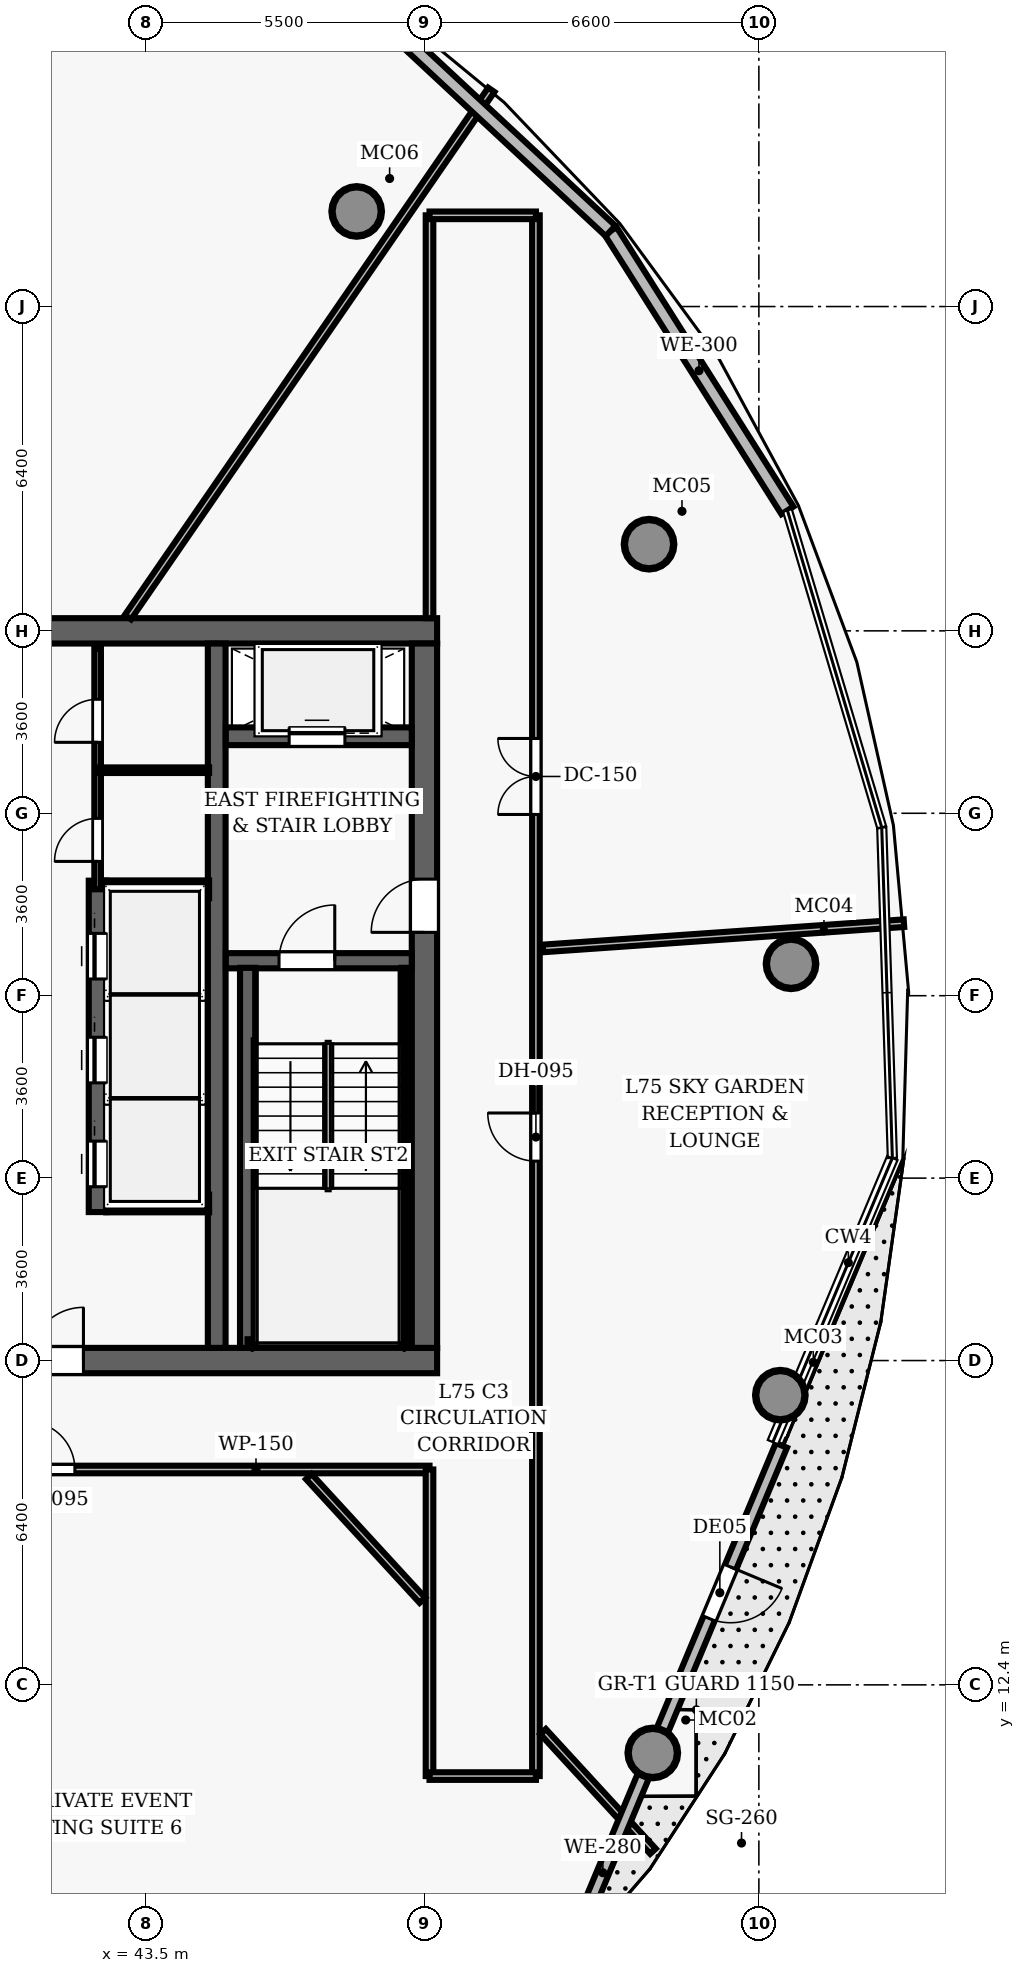
"""IFC4 building model, lengths in metres.
Left out: names, types, materials, properties, quantities, classifications, styles, units other than length and angle.
Written with IfcOpenShell. Run it as: python <this file> out.ifc"""

import sys

from ifc_helpers import new_model, si_unit, direction, frame, frame_2d, origin, origin_2d, place, context, subcontext, project, spatial, rectangle, hollow_circle, extrude, element, fill, save


model = new_model("IFC4")
c1 = context("Model", 3, precision=1e-05, world=origin(), true_north=direction((0.0, 1.0)))
c2 = subcontext(c1, "Body", "Model", "MODEL_VIEW")
j1 = project(units=[si_unit("LENGTHUNIT", "METRE"), si_unit("PLANEANGLEUNIT", "RADIAN")], contexts=[c1])
p1 = place(None, origin())
s1 = spatial("IfcSite", under=j1, at=p1, CompositionType="ELEMENT")
p2 = place(p1, origin())
s2 = spatial("IfcBuilding", under=s1, at=p2, CompositionType="ELEMENT")
p3 = place(p2, frame((0.0, 0.0, 295.95)))
s3 = spatial("IfcBuildingStorey", under=s2, at=p3, CompositionType="ELEMENT", Elevation=295.95)
p4 = place(p3, frame((26.75, 18.8, 0.0), z_axis=(0.0, 0.0, 1.0), x_axis=(1.0, 0.0, 0.0)))
e1 = element("IfcWall", 1, at=p4, inside=s3, PredefinedType="SHEAR", context=c2, shape_type="SweptSolid", body=[
    extrude(rectangle(XDim=22.5, YDim=0.5, at=frame_2d((11.25, 0.0))), origin(), (0.0, 0.0, 1.0), 3.85),
])
p5 = place(p4, frame((14.47, 0.0, 0.0)))
e2 = element("IfcOpeningElement", 2, at=p5, cuts=e1, PredefinedType="OPENING", context=c2, shape_type="SweptSolid", body=[
    extrude(rectangle(XDim=1.05, YDim=2.15, at=frame_2d((0.525, 1.075))), frame((0.0, 0.26, 0.0), z_axis=(0.0, -1.0, 0.0), x_axis=(1.0, 0.0, 0.0)), (0.0, 0.0, 1.0), 0.52),
])
p6 = place(p3, frame((26.75, 33.2, 0.0), z_axis=(0.0, 0.0, 1.0), x_axis=(1.0, 0.0, 0.0)))
e3 = element("IfcWall", 3, at=p6, inside=s3, PredefinedType="SHEAR", context=c2, shape_type="SweptSolid", body=[
    extrude(rectangle(XDim=22.5, YDim=0.5, at=frame_2d((11.25, 0.0))), origin(), (0.0, 0.0, 1.0), 3.85),
])
p7 = place(p3, frame((49.0, 19.05, 0.0), z_axis=(0.0, 0.0, 1.0), x_axis=(0.0, 1.0, 0.0)))
e4 = element("IfcWall", 4, at=p7, inside=s3, PredefinedType="SHEAR", context=c2, shape_type="SweptSolid", body=[
    extrude(rectangle(XDim=13.9, YDim=0.5, at=frame_2d((6.95, 0.0))), origin(), (0.0, 0.0, 1.0), 3.85),
])
p8 = place(p7, frame((8.2, 0.0, 0.0)))
e5 = element("IfcOpeningElement", 5, at=p8, cuts=e4, PredefinedType="OPENING", context=c2, shape_type="SweptSolid", body=[
    extrude(rectangle(XDim=1.05, YDim=2.15, at=frame_2d((0.525, 1.075))), frame((0.0, 0.26, 0.0), z_axis=(0.0, -1.0, 0.0), x_axis=(1.0, 0.0, 0.0)), (0.0, 0.0, 1.0), 0.52),
])
p9 = place(p3, frame((44.9, 19.05, 0.0), z_axis=(0.0, 0.0, 1.0), x_axis=(0.0, 1.0, 0.0)))
e6 = element("IfcWall", 6, at=p9, inside=s3, PredefinedType="SHEAR", context=c2, shape_type="SweptSolid", body=[
    extrude(rectangle(XDim=13.9, YDim=0.35, at=frame_2d((6.95, 0.0))), origin(), (0.0, 0.0, 1.0), 3.85),
])
for number, where, z_axis, x_axis in (
    (7, (53.506, 11.056, 0.0), (0.0, 0.0, 1.0), (1.0, 0.0, 0.0)),
    (8, (56.024, 18.116, 0.0), (0.0, 0.0, 1.0), (1.0, 0.0, 0.0)),
    (9, (56.235, 26.629, 0.0), (0.0, 0.0, 1.0), (1.0, 0.0, 0.0)),
    (10, (53.433, 34.91, 0.0), (0.0, 0.0, 1.0), (1.0, 0.0, 0.0)),
    (11, (47.662, 41.477, 0.0), (0.0, 0.0, 1.0), (1.0, 0.0, 0.0)),
):
    element("IfcColumn", number, at=place(p3, frame(where, z_axis=z_axis, x_axis=x_axis)), inside=s3, PredefinedType="COLUMN", context=c2, shape_type="SweptSolid", body=[
        extrude(hollow_circle(Radius=0.5, WallThickness=0.045, at=origin_2d()), origin(), (0.0, 0.0, 1.0), 3.85),
    ])
p10 = place(p3, frame((45.08, 26.69, 0.0), z_axis=(0.0, 0.0, 1.0), x_axis=(1.0, 0.0, 0.0)))
e12 = element("IfcWall", 12, at=p10, inside=s3, PredefinedType="SHEAR", context=c2, shape_type="SweptSolid", body=[
    extrude(rectangle(XDim=3.67, YDim=0.3, at=frame_2d((1.835, 0.0))), origin(), (0.0, 0.0, 1.0), 3.85),
])
p11 = place(p10, frame((1.05, 0.0, 0.0)))
e13 = element("IfcOpeningElement", 13, at=p11, cuts=e12, PredefinedType="OPENING", context=c2, shape_type="SweptSolid", body=[
    extrude(rectangle(XDim=1.1, YDim=2.15, at=frame_2d((0.55, 1.075))), frame((0.0, 0.16, 0.0), z_axis=(0.0, -1.0, 0.0), x_axis=(1.0, 0.0, 0.0)), (0.0, 0.0, 1.0), 0.32),
])
p12 = place(p3, frame((45.51, 19.05, 0.0), z_axis=(0.0, 0.0, 1.0), x_axis=(0.0, 1.0, 0.0)))
e14 = element("IfcWall", 14, at=p12, inside=s3, PredefinedType="SHEAR", context=c2, shape_type="SweptSolid", body=[
    extrude(rectangle(XDim=7.5, YDim=0.3, at=frame_2d((3.75, 0.0))), origin(), (0.0, 0.0, 1.0), 3.85),
])
p13 = place(p3, frame((48.605, 19.1, 0.0), z_axis=(0.0, 0.0, 1.0), x_axis=(0.0, 1.0, 0.0)))
e15 = element("IfcWall", 15, at=p13, inside=s3, PredefinedType="SHEAR", context=c2, shape_type="SweptSolid", body=[
    extrude(rectangle(XDim=7.45, YDim=0.12, at=frame_2d((3.725, 0.0))), origin(), (0.0, 0.0, 1.0), 3.85),
])
p14 = place(p3, frame((45.51, 19.16, 0.0), z_axis=(0.0, 0.0, 1.0), x_axis=(1.0, 0.0, 0.0)))
e16 = element("IfcWall", 16, at=p14, inside=s3, PredefinedType="SHEAR", context=c2, shape_type="SweptSolid", body=[
    extrude(rectangle(XDim=3.095, YDim=0.12, at=frame_2d((1.547, 0.0))), origin(), (0.0, 0.0, 1.0), 3.85),
])
p15 = place(p3, frame((45.08, 31.12, 0.0), z_axis=(0.0, 0.0, 1.0), x_axis=(1.0, 0.0, 0.0)))
e17 = element("IfcWall", 17, at=p15, inside=s3, PredefinedType="SHEAR", context=c2, shape_type="SweptSolid", body=[
    extrude(rectangle(XDim=3.67, YDim=0.35, at=frame_2d((1.835, 0.0))), origin(), (0.0, 0.0, 1.0), 3.04),
])
p16 = place(p15, frame((1.25, 0.0, 0.0)))
e18 = element("IfcOpeningElement", 18, at=p16, cuts=e17, PredefinedType="OPENING", context=c2, shape_type="SweptSolid", body=[
    extrude(rectangle(XDim=1.1, YDim=2.15, at=frame_2d((0.55, 1.075))), frame((0.0, 0.185, 0.0), z_axis=(0.0, -1.0, 0.0), x_axis=(1.0, 0.0, 0.0)), (0.0, 0.0, 1.0), 0.37),
])
p17 = place(p3, frame((42.55, 21.73, 0.0), z_axis=(0.0, 0.0, 1.0), x_axis=(0.0, 1.0, 0.0)))
e19 = element("IfcWall", 19, at=p17, inside=s3, PredefinedType="SHEAR", context=c2, shape_type="SweptSolid", body=[
    extrude(rectangle(XDim=6.54, YDim=0.35, at=frame_2d((3.27, 0.0))), origin(), (0.0, 0.0, 1.0), 3.04),
])
p18 = place(p17, frame((0.5, 0.0, 0.0)))
e20 = element("IfcOpeningElement", 20, at=p18, cuts=e19, PredefinedType="OPENING", context=c2, shape_type="SweptSolid", body=[
    extrude(rectangle(XDim=0.9, YDim=2.15, at=frame_2d((0.45, 1.075))), frame((0.0, 0.185, 0.0), z_axis=(0.0, -1.0, 0.0), x_axis=(1.0, 0.0, 0.0)), (0.0, 0.0, 1.0), 0.37),
])
p19 = place(p17, frame((2.55, 0.0, 0.0)))
e21 = element("IfcOpeningElement", 21, at=p19, cuts=e19, PredefinedType="OPENING", context=c2, shape_type="SweptSolid", body=[
    extrude(rectangle(XDim=0.9, YDim=2.15, at=frame_2d((0.45, 1.075))), frame((0.0, 0.185, 0.0), z_axis=(0.0, -1.0, 0.0), x_axis=(1.0, 0.0, 0.0)), (0.0, 0.0, 1.0), 0.37),
])
p20 = place(p17, frame((4.6, 0.0, 0.0)))
e22 = element("IfcOpeningElement", 22, at=p20, cuts=e19, PredefinedType="OPENING", context=c2, shape_type="SweptSolid", body=[
    extrude(rectangle(XDim=0.9, YDim=2.15, at=frame_2d((0.45, 1.075))), frame((0.0, 0.185, 0.0), z_axis=(0.0, -1.0, 0.0), x_axis=(1.0, 0.0, 0.0)), (0.0, 0.0, 1.0), 0.37),
])
for number, where, z_axis, x_axis in (
    (23, (42.72, 21.9, 0.0), (0.0, 0.0, 1.0), (1.0, 0.0, 0.0)),
    (24, (42.72, 28.1, 0.0), (0.0, 0.0, 1.0), (1.0, 0.0, 0.0)),
):
    element("IfcWall", number, at=place(p3, frame(where, z_axis=z_axis, x_axis=x_axis)), inside=s3, PredefinedType="SHEAR", context=c2, shape_type="SweptSolid", body=[
        extrude(rectangle(XDim=2.03, YDim=0.35, at=frame_2d((1.015, 0.0))), origin(), (0.0, 0.0, 1.0), 3.04),
    ])
p21 = place(p3, frame((42.55, 28.1, 0.0), z_axis=(0.0, 0.0, 1.0), x_axis=(0.0, 1.0, 0.0)))
e25 = element("IfcWall", 25, at=p21, inside=s3, PredefinedType="PARTITIONING", context=c2, shape_type="SweptSolid", body=[
    extrude(rectangle(XDim=4.75, YDim=0.13, at=frame_2d((2.375, 0.0))), origin(), (0.0, 0.0, 1.0), 3.04),
])
p22 = place(p21, frame((0.55, 0.0, 0.0)))
e26 = element("IfcOpeningElement", 26, at=p22, cuts=e25, PredefinedType="OPENING", context=c2, shape_type="SweptSolid", body=[
    extrude(rectangle(XDim=0.85, YDim=2.1, at=frame_2d((0.425, 1.05))), frame((0.0, 0.075, 0.0), z_axis=(0.0, -1.0, 0.0), x_axis=(1.0, 0.0, 0.0)), (0.0, 0.0, 1.0), 0.15),
])
p23 = place(p21, frame((2.9, 0.0, 0.0)))
e27 = element("IfcOpeningElement", 27, at=p23, cuts=e25, PredefinedType="OPENING", context=c2, shape_type="SweptSolid", body=[
    extrude(rectangle(XDim=0.85, YDim=2.1, at=frame_2d((0.425, 1.05))), frame((0.0, 0.075, 0.0), z_axis=(0.0, -1.0, 0.0), x_axis=(1.0, 0.0, 0.0)), (0.0, 0.0, 1.0), 0.15),
])
p24 = place(p3, frame((42.55, 30.45, 0.0), z_axis=(0.0, 0.0, 1.0), x_axis=(1.0, 0.0, 0.0)))
e28 = element("IfcWall", 28, at=p24, inside=s3, PredefinedType="PARTITIONING", context=c2, shape_type="SweptSolid", body=[
    extrude(rectangle(XDim=2.2, YDim=0.11, at=frame_2d((1.1, 0.0))), origin(), (0.0, 0.0, 1.0), 3.04),
])
p25 = place(p3, frame((26.9, 16.65, 0.0), z_axis=(0.0, 0.0, 1.0), x_axis=(1.0, 0.0, 0.0)))
e29 = element("IfcWall", 29, at=p25, inside=s3, PredefinedType="PARTITIONING", context=c2, shape_type="SweptSolid", body=[
    extrude(rectangle(XDim=22.2, YDim=0.15, at=frame_2d((11.1, 0.0))), origin(), (0.0, 0.0, 1.0), 3.04),
])
p26 = place(p25, frame((6.965, 0.0, 0.0)))
e30 = element("IfcOpeningElement", 30, at=p26, cuts=e29, PredefinedType="OPENING", context=c2, shape_type="SweptSolid", body=[
    extrude(rectangle(XDim=0.95, YDim=2.15, at=frame_2d((0.475, 1.075))), frame((0.0, 0.085, 0.0), z_axis=(0.0, -1.0, 0.0), x_axis=(1.0, 0.0, 0.0)), (0.0, 0.0, 1.0), 0.17),
])
p27 = place(p25, frame((14.251, 0.0, 0.0)))
e31 = element("IfcOpeningElement", 31, at=p27, cuts=e29, PredefinedType="OPENING", context=c2, shape_type="SweptSolid", body=[
    extrude(rectangle(XDim=0.95, YDim=2.15, at=frame_2d((0.475, 1.075))), frame((0.0, 0.085, 0.0), z_axis=(0.0, -1.0, 0.0), x_axis=(1.0, 0.0, 0.0)), (0.0, 0.0, 1.0), 0.17),
])
p28 = place(p3, frame((51.2, 10.6, 0.0), z_axis=(0.0, 0.0, 1.0), x_axis=(0.0, 1.0, 0.0)))
e32 = element("IfcWall", 32, at=p28, inside=s3, PredefinedType="PARTITIONING", context=c2, shape_type="SweptSolid", body=[
    extrude(rectangle(XDim=30.8, YDim=0.15, at=frame_2d((15.4, 0.0))), origin(), (0.0, 0.0, 1.0), 3.04),
])
p29 = place(p28, frame((18.976, 0.0, 0.0)))
e33 = element("IfcOpeningElement", 33, at=p29, cuts=e32, PredefinedType="OPENING", context=c2, shape_type="SweptSolid", body=[
    extrude(rectangle(XDim=1.5, YDim=2.2, at=frame_2d((0.75, 1.1))), frame((0.0, 0.085, 0.0), z_axis=(0.0, -1.0, 0.0), x_axis=(1.0, 0.0, 0.0)), (0.0, 0.0, 1.0), 0.17),
])
p30 = place(p28, frame((12.135, 0.0, 0.0)))
e34 = element("IfcOpeningElement", 34, at=p30, cuts=e32, PredefinedType="OPENING", context=c2, shape_type="SweptSolid", body=[
    extrude(rectangle(XDim=0.95, YDim=2.15, at=frame_2d((0.475, 1.075))), frame((0.0, 0.085, 0.0), z_axis=(0.0, -1.0, 0.0), x_axis=(1.0, 0.0, 0.0)), (0.0, 0.0, 1.0), 0.17),
])
p31 = place(p3, frame((49.1, 10.6, 0.0), z_axis=(0.0, 0.0, 1.0), x_axis=(0.0, 1.0, 0.0)))
e35 = element("IfcWall", 35, at=p31, inside=s3, PredefinedType="PARTITIONING", context=c2, shape_type="SweptSolid", body=[
    extrude(rectangle(XDim=6.05, YDim=0.15, at=frame_2d((3.025, 0.0))), origin(), (0.0, 0.0, 1.0), 3.04),
])
p32 = place(p3, frame((49.1, 33.45, 0.0), z_axis=(0.0, 0.0, 1.0), x_axis=(0.0, 1.0, 0.0)))
e36 = element("IfcWall", 36, at=p32, inside=s3, PredefinedType="PARTITIONING", context=c2, shape_type="SweptSolid", body=[
    extrude(rectangle(XDim=7.95, YDim=0.15, at=frame_2d((3.975, 0.0))), origin(), (0.0, 0.0, 1.0), 3.04),
])
for number, where, z_axis, x_axis in (
    (37, (49.1, 10.6, 0.0), (0.0, 0.0, 1.0), (1.0, 0.0, 0.0)),
    (38, (49.1, 41.4, 0.0), (0.0, 0.0, 1.0), (1.0, 0.0, 0.0)),
):
    element("IfcWall", number, at=place(p3, frame(where, z_axis=z_axis, x_axis=x_axis)), inside=s3, PredefinedType="PARTITIONING", context=c2, shape_type="SweptSolid", body=[
        extrude(rectangle(XDim=2.1, YDim=0.15, at=frame_2d((1.05, 0.0))), origin(), (0.0, 0.0, 1.0), 3.04),
    ])
p33 = place(p3, frame((51.34, 26.933, 0.0), z_axis=(0.0, 0.0, 1.0), x_axis=(0.99756465594, 0.069747811568, 0.0)))
e39 = element("IfcWall", 39, at=p33, inside=s3, PredefinedType="PARTITIONING", context=c2, shape_type="SweptSolid", body=[
    extrude(rectangle(XDim=7.141, YDim=0.15, at=frame_2d((3.57, 0.0))), origin(), (0.0, 0.0, 1.0), 3.04),
])
p34 = place(p3, frame((43.148, 33.47, 0.0), z_axis=(0.0, 0.0, 1.0), x_axis=(0.56742778263, 0.823423166725, 0.0)))
e40 = element("IfcWall", 40, at=p34, inside=s3, PredefinedType="PARTITIONING", context=c2, shape_type="SweptSolid", body=[
    extrude(rectangle(XDim=12.639, YDim=0.15, at=frame_2d((6.32, 0.0))), origin(), (0.0, 0.0, 1.0), 3.04),
])
p35 = place(p3, frame((46.718, 16.51, 0.0), z_axis=(0.0, 0.0, 1.0), x_axis=(0.676491436153, -0.736450498548, 0.0)))
e41 = element("IfcWall", 41, at=p35, inside=s3, PredefinedType="PARTITIONING", context=c2, shape_type="SweptSolid", body=[
    extrude(rectangle(XDim=3.314, YDim=0.15, at=frame_2d((1.657, 0.0))), origin(), (0.0, 0.0, 1.0), 3.04),
])
p36 = place(p3, frame((51.34, 11.478, 0.0), z_axis=(0.0, 0.0, 1.0), x_axis=(0.676513721028, -0.736430027403, 0.0)))
e42 = element("IfcWall", 42, at=p36, inside=s3, PredefinedType="PARTITIONING", context=c2, shape_type="SweptSolid", body=[
    extrude(rectangle(XDim=3.207, YDim=0.15, at=frame_2d((1.604, 0.0))), origin(), (0.0, 0.0, 1.0), 3.04),
])
p37 = place(p3, frame((56.045, 17.126, 0.0), z_axis=(0.0, 0.0, 1.0), x_axis=(-0.385512828822, -0.922702475782, 0.0)))
e43 = element("IfcWall", 43, at=p37, inside=s3, PredefinedType="SOLIDWALL", context=c2, shape_type="SweptSolid", body=[
    extrude(rectangle(XDim=11.105, YDim=0.24, at=frame_2d((5.552, 0.0))), origin(), (0.0, 0.0, 1.0), 2.8),
])
p38 = place(p37, frame((2.601, 0.0, 0.0)))
e44 = element("IfcOpeningElement", 44, at=p38, cuts=e43, PredefinedType="OPENING", context=c2, shape_type="SweptSolid", body=[
    extrude(rectangle(XDim=1.1, YDim=2.2, at=frame_2d((0.55, 1.1))), frame((0.0, 0.13, 0.0), z_axis=(0.0, -1.0, 0.0), x_axis=(1.0, 0.0, 0.0)), (0.0, 0.0, 1.0), 0.26),
])
p39 = place(p3, frame((52.673, 41.092, 0.0), z_axis=(0.0, 0.0, 1.0), x_axis=(0.534811791723, -0.844971211009, 0.0)))
e45 = element("IfcWall", 45, at=p39, inside=s3, PredefinedType="SOLIDWALL", context=c2, shape_type="SweptSolid", body=[
    extrude(rectangle(XDim=6.527, YDim=0.28, at=frame_2d((3.264, 0.0))), origin(), (0.0, 0.0, 1.0), 3.625),
])
p40 = place(p3, frame((47.896, 45.538, 0.0), z_axis=(0.0, 0.0, 1.0), x_axis=(0.732033566459, -0.681268564942, 0.0)))
e46 = element("IfcWall", 46, at=p40, inside=s3, PredefinedType="SOLIDWALL", context=c2, shape_type="SweptSolid", body=[
    extrude(rectangle(XDim=6.526, YDim=0.28, at=frame_2d((3.263, 0.0))), origin(), (0.0, 0.0, 1.0), 3.625),
])
p41 = place(p11, origin())
e47 = element("IfcDoor", 47, at=p41, inside=s3, OperationType="SINGLE_SWING_RIGHT", PredefinedType="DOOR", context=c2, shape_type="SweptSolid", body=[
    extrude(rectangle(XDim=1.1, YDim=2.15, at=frame_2d((0.55, 1.075))), frame((0.0, 0.025, 0.0), z_axis=(0.0, -1.0, 0.0), x_axis=(1.0, 0.0, 0.0)), (0.0, 0.0, 1.0), 0.05),
])
fill(e13, e47)
p42 = place(p8, origin())
e48 = element("IfcDoor", 48, at=p42, inside=s3, OperationType="SINGLE_SWING_LEFT", PredefinedType="DOOR", context=c2, shape_type="SweptSolid", body=[
    extrude(rectangle(XDim=1.05, YDim=2.15, at=frame_2d((0.525, 1.075))), frame((0.0, 0.025, 0.0), z_axis=(0.0, -1.0, 0.0), x_axis=(1.0, 0.0, 0.0)), (0.0, 0.0, 1.0), 0.05),
])
fill(e5, e48)
p43 = place(p5, origin())
e49 = element("IfcDoor", 49, at=p43, inside=s3, OperationType="SINGLE_SWING_RIGHT", PredefinedType="DOOR", context=c2, shape_type="SweptSolid", body=[
    extrude(rectangle(XDim=1.05, YDim=2.15, at=frame_2d((0.525, 1.075))), frame((0.0, 0.025, 0.0), z_axis=(0.0, -1.0, 0.0), x_axis=(1.0, 0.0, 0.0)), (0.0, 0.0, 1.0), 0.05),
])
fill(e2, e49)
p44 = place(p22, origin())
e50 = element("IfcDoor", 50, at=p44, inside=s3, OperationType="SINGLE_SWING_LEFT", PredefinedType="DOOR", context=c2, shape_type="SweptSolid", body=[
    extrude(rectangle(XDim=0.85, YDim=2.1, at=frame_2d((0.425, 1.05))), frame((0.0, 0.025, 0.0), z_axis=(0.0, -1.0, 0.0), x_axis=(1.0, 0.0, 0.0)), (0.0, 0.0, 1.0), 0.05),
])
fill(e26, e50)
p45 = place(p23, origin())
e51 = element("IfcDoor", 51, at=p45, inside=s3, OperationType="SINGLE_SWING_LEFT", PredefinedType="DOOR", context=c2, shape_type="SweptSolid", body=[
    extrude(rectangle(XDim=0.85, YDim=2.1, at=frame_2d((0.425, 1.05))), frame((0.0, 0.025, 0.0), z_axis=(0.0, -1.0, 0.0), x_axis=(1.0, 0.0, 0.0)), (0.0, 0.0, 1.0), 0.05),
])
fill(e27, e51)
p46 = place(p29, origin())
e52 = element("IfcDoor", 52, at=p46, inside=s3, OperationType="DOUBLE_DOOR_SINGLE_SWING", PredefinedType="DOOR", context=c2, shape_type="SweptSolid", body=[
    extrude(rectangle(XDim=1.5, YDim=2.2, at=frame_2d((0.75, 1.1))), frame((0.0, 0.025, 0.0), z_axis=(0.0, -1.0, 0.0), x_axis=(1.0, 0.0, 0.0)), (0.0, 0.0, 1.0), 0.05),
])
fill(e33, e52)
p47 = place(p27, origin())
e53 = element("IfcDoor", 53, at=p47, inside=s3, OperationType="SINGLE_SWING_LEFT", PredefinedType="DOOR", context=c2, shape_type="SweptSolid", body=[
    extrude(rectangle(XDim=0.95, YDim=2.15, at=frame_2d((0.475, 1.075))), frame((0.0, 0.025, 0.0), z_axis=(0.0, -1.0, 0.0), x_axis=(1.0, 0.0, 0.0)), (0.0, 0.0, 1.0), 0.05),
])
fill(e31, e53)
p48 = place(p30, origin())
e54 = element("IfcDoor", 54, at=p48, inside=s3, OperationType="SINGLE_SWING_RIGHT", PredefinedType="DOOR", context=c2, shape_type="SweptSolid", body=[
    extrude(rectangle(XDim=0.95, YDim=2.15, at=frame_2d((0.475, 1.075))), frame((0.0, 0.025, 0.0), z_axis=(0.0, -1.0, 0.0), x_axis=(1.0, 0.0, 0.0)), (0.0, 0.0, 1.0), 0.05),
])
fill(e34, e54)
p49 = place(p18, origin())
e55 = element("IfcDoor", 55, at=p49, inside=s3, OperationType="SLIDING_TO_LEFT", PredefinedType="DOOR", context=c2, shape_type="SweptSolid", body=[
    extrude(rectangle(XDim=0.9, YDim=2.15, at=frame_2d((0.45, 1.075))), frame((0.0, 0.025, 0.0), z_axis=(0.0, -1.0, 0.0), x_axis=(1.0, 0.0, 0.0)), (0.0, 0.0, 1.0), 0.05),
])
fill(e20, e55)
p50 = place(p19, origin())
e56 = element("IfcDoor", 56, at=p50, inside=s3, OperationType="SLIDING_TO_LEFT", PredefinedType="DOOR", context=c2, shape_type="SweptSolid", body=[
    extrude(rectangle(XDim=0.9, YDim=2.15, at=frame_2d((0.45, 1.075))), frame((0.0, 0.025, 0.0), z_axis=(0.0, -1.0, 0.0), x_axis=(1.0, 0.0, 0.0)), (0.0, 0.0, 1.0), 0.05),
])
fill(e21, e56)
p51 = place(p20, origin())
e57 = element("IfcDoor", 57, at=p51, inside=s3, OperationType="SLIDING_TO_LEFT", PredefinedType="DOOR", context=c2, shape_type="SweptSolid", body=[
    extrude(rectangle(XDim=0.9, YDim=2.15, at=frame_2d((0.45, 1.075))), frame((0.0, 0.025, 0.0), z_axis=(0.0, -1.0, 0.0), x_axis=(1.0, 0.0, 0.0)), (0.0, 0.0, 1.0), 0.05),
])
fill(e22, e57)
p52 = place(p16, origin())
e58 = element("IfcDoor", 58, at=p52, inside=s3, OperationType="SLIDING_TO_LEFT", PredefinedType="DOOR", context=c2, shape_type="SweptSolid", body=[
    extrude(rectangle(XDim=1.1, YDim=2.15, at=frame_2d((0.55, 1.075))), frame((0.0, 0.025, 0.0), z_axis=(0.0, -1.0, 0.0), x_axis=(1.0, 0.0, 0.0)), (0.0, 0.0, 1.0), 0.05),
])
fill(e18, e58)
p53 = place(p38, origin())
e59 = element("IfcDoor", 59, at=p53, inside=s3, OperationType="SINGLE_SWING_LEFT", PredefinedType="DOOR", context=c2, shape_type="SweptSolid", body=[
    extrude(rectangle(XDim=1.1, YDim=2.2, at=frame_2d((0.55, 1.1))), frame((0.0, 0.025, 0.0), z_axis=(0.0, -1.0, 0.0), x_axis=(1.0, 0.0, 0.0)), (0.0, 0.0, 1.0), 0.05),
])
fill(e44, e59)
save(model, sys.argv[1])
